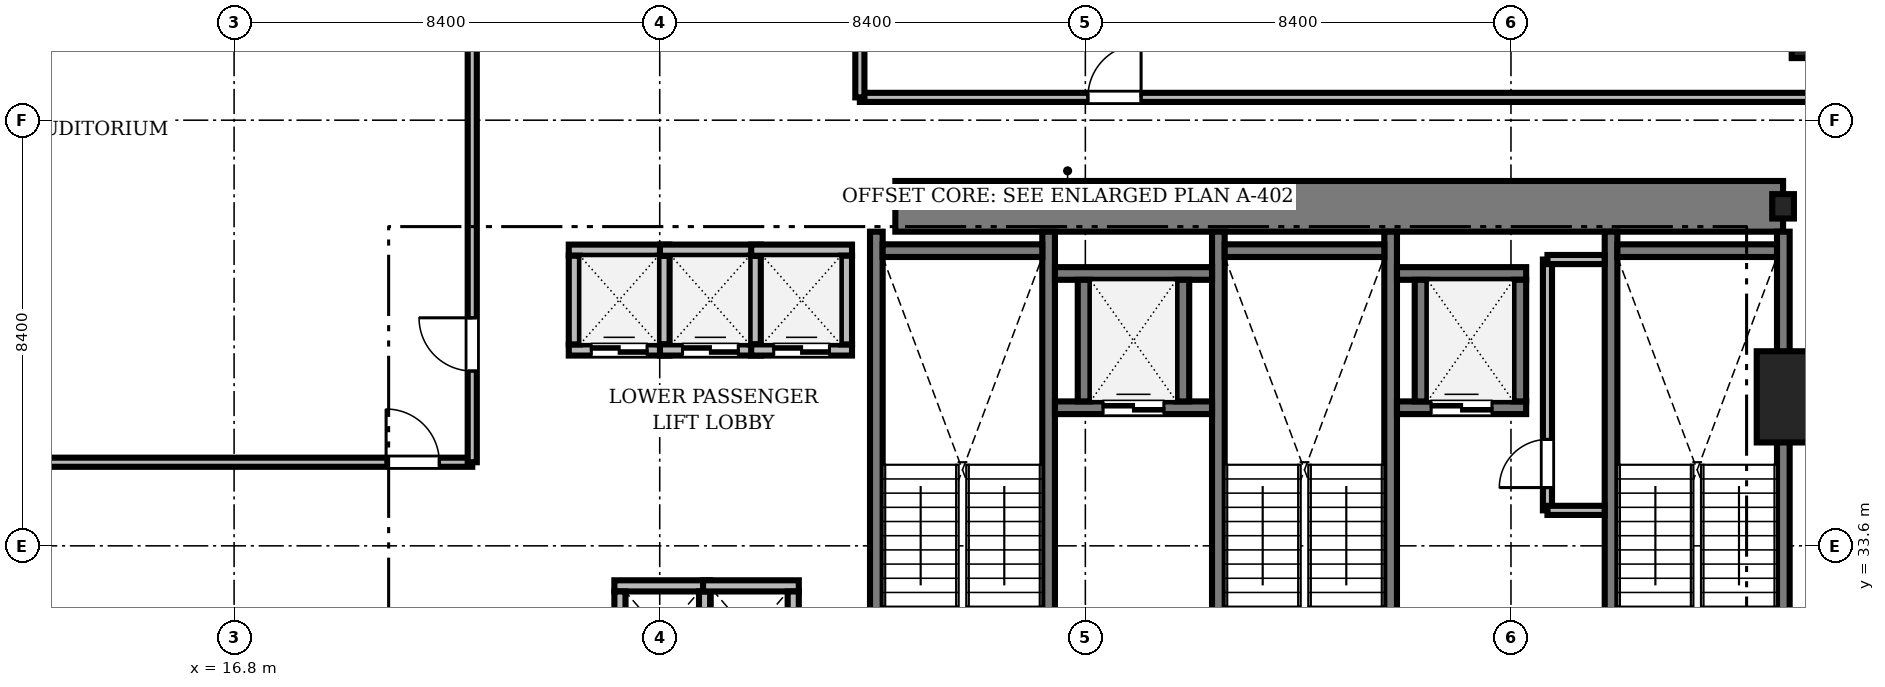
"""IFC4 building model, lengths in metres.
Left out: names, types, materials, properties, quantities, classifications, styles, units other than length and angle.
Written with IfcOpenShell. Run it as: python <this file> out.ifc"""

import sys

from ifc_helpers import new_model, si_unit, direction, frame, frame_2d, origin, origin_2d, place, context, subcontext, project, spatial, rectangle, i_section, extrude, source, transform, mapped, element, fill, save


model = new_model("IFC4")
c1 = context("Model", 3, precision=1e-05, world=origin(), true_north=direction((0.0, 1.0)))
c2 = subcontext(c1, "Body", "Model", "MODEL_VIEW")
j1 = project(units=[si_unit("LENGTHUNIT", "METRE"), si_unit("PLANEANGLEUNIT", "RADIAN")], contexts=[c1])
p1 = place(None, origin())
s1 = spatial("IfcSite", under=j1, at=p1, CompositionType="ELEMENT")
p2 = place(p1, origin())
s2 = spatial("IfcBuilding", under=s1, at=p2, CompositionType="ELEMENT")
p3 = place(p2, frame((0.0, 0.0, 64.1)))
s3 = spatial("IfcBuildingStorey", under=s2, at=p3, CompositionType="ELEMENT", Elevation=64.1)
m1 = source(origin(), c2, "Body", "SweptSolid", [
    extrude(rectangle(XDim=17.52, YDim=1.0, at=frame_2d((8.76, 0.0))), origin(), (0.0, 0.0, 1.0), 3.41),
])
p4 = place(p3, frame((29.85, 40.3, 0.0), z_axis=(0.0, 0.0, 1.0), x_axis=(1.0, 0.0, 0.0)))
e1 = element("IfcWall", 1, at=p4, inside=s3, PredefinedType="SHEAR", context=c2, shape_type="MappedRepresentation", body=[
    mapped(m1, transform((0.0, 0.0, 0.0), scale=1.0)),
])
m2 = source(origin(), c2, "Body", "SweptSolid", [
    extrude(i_section(OverallWidth=0.428, OverallDepth=0.481, WebThickness=0.04, FlangeThickness=0.063, FilletRadius=0.015, at=origin_2d()), origin(), (0.0, 0.0, 1.0), 3.41),
])
p5 = place(p3, frame((47.37, 40.3, 0.0), z_axis=(0.0, 0.0, 1.0), x_axis=(1.0, 0.0, 0.0)))
e2 = element("IfcColumn", 2, at=p5, inside=s3, PredefinedType="COLUMN", context=c2, shape_type="MappedRepresentation", body=[
    mapped(m2, transform((0.0, 0.0, 0.0), scale=1.0)),
])
m3 = source(origin(), c2, "Body", "SweptSolid", [
    extrude(rectangle(XDim=1.8, YDim=1.8, at=origin_2d()), origin(), (0.0, 0.0, 1.0), 3.41),
])
p6 = place(p3, frame((47.75, 36.54, 0.0), z_axis=(0.0, 0.0, 1.0), x_axis=(1.0, 0.0, 0.0)))
e3 = element("IfcColumn", 3, at=p6, inside=s3, PredefinedType="COLUMN", context=c2, shape_type="MappedRepresentation", body=[
    mapped(m3, transform((0.0, 0.0, 0.0), scale=1.0)),
])
m4 = source(origin(), c2, "Body", "SweptSolid", [
    extrude(i_section(OverallWidth=0.419, OverallDepth=0.449, WebThickness=0.031, FlangeThickness=0.048, FilletRadius=0.015, at=origin_2d()), origin(), (0.0, 0.0, 1.0), 3.41),
])
p7 = place(p3, frame((47.75, 43.45, 0.0), z_axis=(0.0, 0.0, 1.0), x_axis=(1.0, 0.0, 0.0)))
e4 = element("IfcColumn", 4, at=p7, inside=s3, PredefinedType="COLUMN", context=c2, shape_type="MappedRepresentation", body=[
    mapped(m4, transform((0.0, 0.0, 0.0), scale=1.0)),
])
m5 = source(origin(), c2, "Body", "SweptSolid", [
    extrude(rectangle(XDim=9.15, YDim=0.25, at=frame_2d((4.575, 0.0))), origin(), (0.0, 0.0, 1.0), 3.45),
])
for number, where, z_axis, x_axis in (
    (5, (29.475, 30.65, 0.0), (0.0, 0.0, 1.0), (0.0, 1.0, 0.0)),
    (6, (32.875, 30.65, 0.0), (0.0, 0.0, 1.0), (0.0, 1.0, 0.0)),
):
    element("IfcWall", number, at=place(p3, frame(where, z_axis=z_axis, x_axis=x_axis)), inside=s3, PredefinedType="SOLIDWALL", context=c2, shape_type="MappedRepresentation", body=[
        mapped(m5, transform((0.0, 0.0, 0.0), scale=1.0)),
    ])
m6 = source(origin(), c2, "Body", "SweptSolid", [
    extrude(rectangle(XDim=3.15, YDim=0.25, at=frame_2d((1.575, 0.0))), origin(), (0.0, 0.0, 1.0), 3.45),
])
p8 = place(p3, frame((29.6, 39.425, 0.0), z_axis=(0.0, 0.0, 1.0), x_axis=(1.0, 0.0, 0.0)))
e7 = element("IfcWall", 7, at=p8, inside=s3, PredefinedType="SOLIDWALL", context=c2, shape_type="MappedRepresentation", body=[
    mapped(m6, transform((0.0, 0.0, 0.0), scale=1.0)),
])
for number, where, z_axis, x_axis in (
    (8, (36.225, 30.65, 0.0), (0.0, 0.0, 1.0), (0.0, 1.0, 0.0)),
    (9, (39.625, 30.65, 0.0), (0.0, 0.0, 1.0), (0.0, 1.0, 0.0)),
):
    element("IfcWall", number, at=place(p3, frame(where, z_axis=z_axis, x_axis=x_axis)), inside=s3, PredefinedType="SOLIDWALL", context=c2, shape_type="MappedRepresentation", body=[
        mapped(m5, transform((0.0, 0.0, 0.0), scale=1.0)),
    ])
p9 = place(p3, frame((36.35, 39.425, 0.0), z_axis=(0.0, 0.0, 1.0), x_axis=(1.0, 0.0, 0.0)))
e10 = element("IfcWall", 10, at=p9, inside=s3, PredefinedType="SOLIDWALL", context=c2, shape_type="MappedRepresentation", body=[
    mapped(m6, transform((0.0, 0.0, 0.0), scale=1.0)),
])
for number, where, z_axis, x_axis in (
    (11, (43.975, 30.65, 0.0), (0.0, 0.0, 1.0), (0.0, 1.0, 0.0)),
    (12, (47.375, 30.65, 0.0), (0.0, 0.0, 1.0), (0.0, 1.0, 0.0)),
):
    element("IfcWall", number, at=place(p3, frame(where, z_axis=z_axis, x_axis=x_axis)), inside=s3, PredefinedType="SOLIDWALL", context=c2, shape_type="MappedRepresentation", body=[
        mapped(m5, transform((0.0, 0.0, 0.0), scale=1.0)),
    ])
p10 = place(p3, frame((44.1, 39.425, 0.0), z_axis=(0.0, 0.0, 1.0), x_axis=(1.0, 0.0, 0.0)))
e13 = element("IfcWall", 13, at=p10, inside=s3, PredefinedType="SOLIDWALL", context=c2, shape_type="MappedRepresentation", body=[
    mapped(m6, transform((0.0, 0.0, 0.0), scale=1.0)),
])
m7 = source(origin(), c2, "Body", "SweptSolid", [
    extrude(rectangle(XDim=1.99, YDim=0.22, at=frame_2d((0.995, 0.0))), origin(), (0.0, 0.0, 1.0), 3.41),
])
p11 = place(p3, frame((23.405, 37.465, 0.0), z_axis=(0.0, 0.0, 1.0), x_axis=(1.0, 0.0, 0.0)))
e14 = element("IfcWall", 14, at=p11, inside=s3, PredefinedType="SOLIDWALL", context=c2, shape_type="MappedRepresentation", body=[
    mapped(m7, transform((0.0, 0.0, 0.0), scale=1.0)),
])
m8 = source(origin(), c2, "Body", "SweptSolid", [
    extrude(rectangle(XDim=1.1, YDim=2.2, at=frame_2d((0.55, 1.1))), frame((0.0, 0.12, 0.0), z_axis=(0.0, -1.0, 0.0), x_axis=(1.0, 0.0, 0.0)), (0.0, 0.0, 1.0), 0.24),
])
p12 = place(p11, frame((0.445, 0.0, 0.0)))
e15 = element("IfcOpeningElement", 15, at=p12, cuts=e14, PredefinedType="OPENING", context=c2, shape_type="MappedRepresentation", body=[
    mapped(m8, transform((0.0, 0.0, 0.0), scale=1.0)),
])
p13 = place(p3, frame((23.405, 39.435, 0.0), z_axis=(0.0, 0.0, 1.0), x_axis=(1.0, 0.0, 0.0)))
e16 = element("IfcWall", 16, at=p13, inside=s3, PredefinedType="SOLIDWALL", context=c2, shape_type="MappedRepresentation", body=[
    mapped(m7, transform((0.0, 0.0, 0.0), scale=1.0)),
])
m9 = source(origin(), c2, "Body", "SweptSolid", [
    extrude(rectangle(XDim=1.75, YDim=0.22, at=frame_2d((0.875, 0.0))), origin(), (0.0, 0.0, 1.0), 3.41),
])
for number, where, z_axis, x_axis in (
    (17, (23.515, 37.575, 0.0), (0.0, 0.0, 1.0), (0.0, 1.0, 0.0)),
    (18, (25.285, 37.575, 0.0), (0.0, 0.0, 1.0), (0.0, 1.0, 0.0)),
):
    element("IfcWall", number, at=place(p3, frame(where, z_axis=z_axis, x_axis=x_axis)), inside=s3, PredefinedType="SOLIDWALL", context=c2, shape_type="MappedRepresentation", body=[
        mapped(m9, transform((0.0, 0.0, 0.0), scale=1.0)),
    ])
p14 = place(p3, frame((25.205, 37.465, 0.0), z_axis=(0.0, 0.0, 1.0), x_axis=(1.0, 0.0, 0.0)))
e19 = element("IfcWall", 19, at=p14, inside=s3, PredefinedType="SOLIDWALL", context=c2, shape_type="MappedRepresentation", body=[
    mapped(m7, transform((0.0, 0.0, 0.0), scale=1.0)),
])
p15 = place(p14, frame((0.445, 0.0, 0.0)))
e20 = element("IfcOpeningElement", 20, at=p15, cuts=e19, PredefinedType="OPENING", context=c2, shape_type="MappedRepresentation", body=[
    mapped(m8, transform((0.0, 0.0, 0.0), scale=1.0)),
])
p16 = place(p3, frame((25.205, 39.435, 0.0), z_axis=(0.0, 0.0, 1.0), x_axis=(1.0, 0.0, 0.0)))
e21 = element("IfcWall", 21, at=p16, inside=s3, PredefinedType="SOLIDWALL", context=c2, shape_type="MappedRepresentation", body=[
    mapped(m7, transform((0.0, 0.0, 0.0), scale=1.0)),
])
p17 = place(p3, frame((27.085, 37.575, 0.0), z_axis=(0.0, 0.0, 1.0), x_axis=(0.0, 1.0, 0.0)))
e22 = element("IfcWall", 22, at=p17, inside=s3, PredefinedType="SOLIDWALL", context=c2, shape_type="MappedRepresentation", body=[
    mapped(m9, transform((0.0, 0.0, 0.0), scale=1.0)),
])
m10 = source(origin(), c2, "Body", "SweptSolid", [
    extrude(rectangle(XDim=1.99, YDim=0.22, at=frame_2d((0.995, 0.0))), origin(), (0.0, 0.0, 1.0), 3.41),
])
p18 = place(p3, frame((27.005, 37.465, 0.0), z_axis=(0.0, 0.0, 1.0), x_axis=(1.0, 0.0, 0.0)))
e23 = element("IfcWall", 23, at=p18, inside=s3, PredefinedType="SOLIDWALL", context=c2, shape_type="MappedRepresentation", body=[
    mapped(m10, transform((0.0, 0.0, 0.0), scale=1.0)),
])
p19 = place(p18, frame((0.445, 0.0, 0.0)))
e24 = element("IfcOpeningElement", 24, at=p19, cuts=e23, PredefinedType="OPENING", context=c2, shape_type="MappedRepresentation", body=[
    mapped(m8, transform((0.0, 0.0, 0.0), scale=1.0)),
])
p20 = place(p3, frame((27.005, 39.435, 0.0), z_axis=(0.0, 0.0, 1.0), x_axis=(1.0, 0.0, 0.0)))
e25 = element("IfcWall", 25, at=p20, inside=s3, PredefinedType="SOLIDWALL", context=c2, shape_type="MappedRepresentation", body=[
    mapped(m10, transform((0.0, 0.0, 0.0), scale=1.0)),
])
p21 = place(p3, frame((28.885, 37.575, 0.0), z_axis=(0.0, 0.0, 1.0), x_axis=(0.0, 1.0, 0.0)))
e26 = element("IfcWall", 26, at=p21, inside=s3, PredefinedType="SOLIDWALL", context=c2, shape_type="MappedRepresentation", body=[
    mapped(m9, transform((0.0, 0.0, 0.0), scale=1.0)),
])
m11 = source(origin(), c2, "Body", "SweptSolid", [
    extrude(rectangle(XDim=3.1, YDim=0.25, at=frame_2d((1.55, 0.0))), origin(), (0.0, 0.0, 1.0), 3.41),
])
p22 = place(p3, frame((33.0, 36.325, 0.0), z_axis=(0.0, 0.0, 1.0), x_axis=(1.0, 0.0, 0.0)))
e27 = element("IfcWall", 27, at=p22, inside=s3, PredefinedType="SOLIDWALL", context=c2, shape_type="MappedRepresentation", body=[
    mapped(m11, transform((0.0, 0.0, 0.0), scale=1.0)),
])
m12 = source(origin(), c2, "Body", "SweptSolid", [
    extrude(rectangle(XDim=1.2, YDim=2.25, at=frame_2d((0.6, 1.125))), frame((0.0, 0.135, 0.0), z_axis=(0.0, -1.0, 0.0), x_axis=(1.0, 0.0, 0.0)), (0.0, 0.0, 1.0), 0.27),
])
p23 = place(p22, frame((0.95, 0.0, 0.0)))
e28 = element("IfcOpeningElement", 28, at=p23, cuts=e27, PredefinedType="OPENING", context=c2, shape_type="MappedRepresentation", body=[
    mapped(m12, transform((0.0, 0.0, 0.0), scale=1.0)),
])
p24 = place(p3, frame((33.0, 38.975, 0.0), z_axis=(0.0, 0.0, 1.0), x_axis=(1.0, 0.0, 0.0)))
e29 = element("IfcWall", 29, at=p24, inside=s3, PredefinedType="SOLIDWALL", context=c2, shape_type="MappedRepresentation", body=[
    mapped(m11, transform((0.0, 0.0, 0.0), scale=1.0)),
])
m13 = source(origin(), c2, "Body", "SweptSolid", [
    extrude(rectangle(XDim=2.4, YDim=0.25, at=frame_2d((1.2, 0.0))), origin(), (0.0, 0.0, 1.0), 3.41),
])
for number, where, z_axis, x_axis in (
    (30, (33.575, 36.45, 0.0), (0.0, 0.0, 1.0), (0.0, 1.0, 0.0)),
    (31, (35.525, 36.45, 0.0), (0.0, 0.0, 1.0), (0.0, 1.0, 0.0)),
):
    element("IfcWall", number, at=place(p3, frame(where, z_axis=z_axis, x_axis=x_axis)), inside=s3, PredefinedType="SOLIDWALL", context=c2, shape_type="MappedRepresentation", body=[
        mapped(m13, transform((0.0, 0.0, 0.0), scale=1.0)),
    ])
m14 = source(origin(), c2, "Body", "SweptSolid", [
    extrude(rectangle(XDim=2.55, YDim=0.25, at=frame_2d((1.275, 0.0))), origin(), (0.0, 0.0, 1.0), 3.41),
])
p25 = place(p3, frame((39.75, 36.325, 0.0), z_axis=(0.0, 0.0, 1.0), x_axis=(1.0, 0.0, 0.0)))
e32 = element("IfcWall", 32, at=p25, inside=s3, PredefinedType="SOLIDWALL", context=c2, shape_type="MappedRepresentation", body=[
    mapped(m14, transform((0.0, 0.0, 0.0), scale=1.0)),
])
p26 = place(p25, frame((0.675, 0.0, 0.0)))
e33 = element("IfcOpeningElement", 33, at=p26, cuts=e32, PredefinedType="OPENING", context=c2, shape_type="MappedRepresentation", body=[
    mapped(m12, transform((0.0, 0.0, 0.0), scale=1.0)),
])
p27 = place(p3, frame((39.75, 38.975, 0.0), z_axis=(0.0, 0.0, 1.0), x_axis=(1.0, 0.0, 0.0)))
e34 = element("IfcWall", 34, at=p27, inside=s3, PredefinedType="SOLIDWALL", context=c2, shape_type="MappedRepresentation", body=[
    mapped(m14, transform((0.0, 0.0, 0.0), scale=1.0)),
])
for number, where, z_axis, x_axis in (
    (35, (40.225, 36.45, 0.0), (0.0, 0.0, 1.0), (0.0, 1.0, 0.0)),
    (36, (42.175, 36.45, 0.0), (0.0, 0.0, 1.0), (0.0, 1.0, 0.0)),
):
    element("IfcWall", number, at=place(p3, frame(where, z_axis=z_axis, x_axis=x_axis)), inside=s3, PredefinedType="SOLIDWALL", context=c2, shape_type="MappedRepresentation", body=[
        mapped(m13, transform((0.0, 0.0, 0.0), scale=1.0)),
    ])
m15 = source(origin(), c2, "Body", "SweptSolid", [
    extrude(rectangle(XDim=1.89, YDim=0.22, at=frame_2d((0.945, 0.0))), origin(), (0.0, 0.0, 1.0), 3.41),
])
p28 = place(p3, frame((24.305, 32.81, 0.0), z_axis=(0.0, 0.0, 1.0), x_axis=(1.0, 0.0, 0.0)))
e37 = element("IfcWall", 37, at=p28, inside=s3, PredefinedType="SOLIDWALL", context=c2, shape_type="MappedRepresentation", body=[
    mapped(m15, transform((0.0, 0.0, 0.0), scale=1.0)),
])
m16 = source(origin(), c2, "Body", "SweptSolid", [
    extrude(rectangle(XDim=1.7, YDim=0.22, at=frame_2d((0.85, 0.0))), origin(), (0.0, 0.0, 1.0), 3.41),
])
for number, where, z_axis, x_axis in (
    (38, (24.415, 31.0, 0.0), (0.0, 0.0, 1.0), (0.0, 1.0, 0.0)),
    (39, (26.085, 31.0, 0.0), (0.0, 0.0, 1.0), (0.0, 1.0, 0.0)),
):
    element("IfcWall", number, at=place(p3, frame(where, z_axis=z_axis, x_axis=x_axis)), inside=s3, PredefinedType="SOLIDWALL", context=c2, shape_type="MappedRepresentation", body=[
        mapped(m16, transform((0.0, 0.0, 0.0), scale=1.0)),
    ])
p29 = place(p3, frame((26.055, 32.81, 0.0), z_axis=(0.0, 0.0, 1.0), x_axis=(1.0, 0.0, 0.0)))
e40 = element("IfcWall", 40, at=p29, inside=s3, PredefinedType="SOLIDWALL", context=c2, shape_type="MappedRepresentation", body=[
    mapped(m15, transform((0.0, 0.0, 0.0), scale=1.0)),
])
p30 = place(p3, frame((27.835, 31.0, 0.0), z_axis=(0.0, 0.0, 1.0), x_axis=(0.0, 1.0, 0.0)))
e41 = element("IfcWall", 41, at=p30, inside=s3, PredefinedType="SOLIDWALL", context=c2, shape_type="MappedRepresentation", body=[
    mapped(m16, transform((0.0, 0.0, 0.0), scale=1.0)),
])
m17 = source(origin(), c2, "Body", "SweptSolid", [
    extrude(rectangle(XDim=19.428, YDim=0.18, at=frame_2d((9.714, 0.0))), origin(), (0.0, 0.0, 1.0), 2.652),
])
p31 = place(p3, frame((29.15, 42.45, 0.0), z_axis=(0.0, 0.0, 1.0), x_axis=(1.0, 0.0, 0.0)))
e42 = element("IfcWall", 42, at=p31, inside=s3, PredefinedType="PARTITIONING", context=c2, shape_type="MappedRepresentation", body=[
    mapped(m17, transform((0.0, 0.0, 0.0), scale=1.0)),
])
m18 = source(origin(), c2, "Body", "SweptSolid", [
    extrude(rectangle(XDim=1.05, YDim=2.2, at=frame_2d((0.525, 1.1))), frame((0.0, 0.1, 0.0), z_axis=(0.0, -1.0, 0.0), x_axis=(1.0, 0.0, 0.0)), (0.0, 0.0, 1.0), 0.2),
])
p32 = place(p31, frame((4.5, 0.0, 0.0)))
e43 = element("IfcOpeningElement", 43, at=p32, cuts=e42, PredefinedType="OPENING", context=c2, shape_type="MappedRepresentation", body=[
    mapped(m18, transform((0.0, 0.0, 0.0), scale=1.0)),
])
m19 = source(origin(), c2, "Body", "SweptSolid", [
    extrude(rectangle(XDim=19.078, YDim=0.18, at=frame_2d((9.539, 0.0))), origin(), (0.0, 0.0, 1.0), 2.652),
])
p33 = place(p3, frame((2.422, 35.25, 0.0), z_axis=(0.0, 0.0, 1.0), x_axis=(1.0, 0.0, 0.0)))
e44 = element("IfcWall", 44, at=p33, inside=s3, PredefinedType="PARTITIONING", context=c2, shape_type="MappedRepresentation", body=[
    mapped(m19, transform((0.0, 0.0, 0.0), scale=1.0)),
])
p34 = place(p33, frame((17.378, 0.0, 0.0)))
e45 = element("IfcOpeningElement", 45, at=p34, cuts=e44, PredefinedType="OPENING", context=c2, shape_type="MappedRepresentation", body=[
    mapped(m18, transform((0.0, 0.0, 0.0), scale=1.0)),
])
m20 = source(origin(), c2, "Body", "SweptSolid", [
    extrude(rectangle(XDim=13.028, YDim=0.18, at=frame_2d((6.514, 0.0))), origin(), (0.0, 0.0, 1.0), 2.652),
])
p35 = place(p3, frame((21.5, 35.25, 0.0), z_axis=(0.0, 0.0, 1.0), x_axis=(0.0, 1.0, 0.0)))
e46 = element("IfcWall", 46, at=p35, inside=s3, PredefinedType="PARTITIONING", context=c2, shape_type="MappedRepresentation", body=[
    mapped(m20, transform((0.0, 0.0, 0.0), scale=1.0)),
])
p36 = place(p35, frame((1.8, 0.0, 0.0)))
e47 = element("IfcOpeningElement", 47, at=p36, cuts=e46, PredefinedType="OPENING", context=c2, shape_type="MappedRepresentation", body=[
    mapped(m18, transform((0.0, 0.0, 0.0), scale=1.0)),
])
m21 = source(origin(), c2, "Body", "SweptSolid", [
    extrude(rectangle(XDim=4.95, YDim=0.18, at=frame_2d((2.475, 0.0))), origin(), (0.0, 0.0, 1.0), 3.41),
])
p37 = place(p3, frame((42.72, 34.3, 0.0), z_axis=(0.0, 0.0, 1.0), x_axis=(0.0, 1.0, 0.0)))
e48 = element("IfcWall", 48, at=p37, inside=s3, PredefinedType="PARTITIONING", context=c2, shape_type="MappedRepresentation", body=[
    mapped(m21, transform((0.0, 0.0, 0.0), scale=1.0)),
])
m22 = source(origin(), c2, "Body", "SweptSolid", [
    extrude(rectangle(XDim=0.95, YDim=2.15, at=frame_2d((0.475, 1.075))), frame((0.0, 0.1, 0.0), z_axis=(0.0, -1.0, 0.0), x_axis=(1.0, 0.0, 0.0)), (0.0, 0.0, 1.0), 0.2),
])
p38 = place(p37, frame((0.45, 0.0, 0.0)))
e49 = element("IfcOpeningElement", 49, at=p38, cuts=e48, PredefinedType="OPENING", context=c2, shape_type="MappedRepresentation", body=[
    mapped(m22, transform((0.0, 0.0, 0.0), scale=1.0)),
])
m23 = source(origin(), c2, "Body", "SweptSolid", [
    extrude(rectangle(XDim=5.828, YDim=0.18, at=frame_2d((2.914, 0.0))), origin(), (0.0, 0.0, 1.0), 2.652),
])
p39 = place(p3, frame((29.15, 42.45, 0.0), z_axis=(0.0, 0.0, 1.0), x_axis=(0.0, 1.0, 0.0)))
e50 = element("IfcWall", 50, at=p39, inside=s3, PredefinedType="PARTITIONING", context=c2, shape_type="MappedRepresentation", body=[
    mapped(m23, transform((0.0, 0.0, 0.0), scale=1.0)),
])
m24 = source(origin(), c2, "Body", "SweptSolid", [
    extrude(rectangle(XDim=1.128, YDim=0.18, at=frame_2d((0.564, 0.0))), origin(), (0.0, 0.0, 1.0), 3.41),
])
for number, where, z_axis, x_axis in (
    (51, (42.72, 34.3, 0.0), (0.0, 0.0, 1.0), (1.0, 0.0, 0.0)),
    (52, (42.72, 39.25, 0.0), (0.0, 0.0, 1.0), (1.0, 0.0, 0.0)),
):
    element("IfcWall", number, at=place(p3, frame(where, z_axis=z_axis, x_axis=x_axis)), inside=s3, PredefinedType="PARTITIONING", context=c2, shape_type="MappedRepresentation", body=[
        mapped(m24, transform((0.0, 0.0, 0.0), scale=1.0)),
    ])
m25 = source(origin(), c2, "Body", "SweptSolid", [
    extrude(rectangle(XDim=1.1, YDim=2.2, at=frame_2d((0.55, 1.1))), frame((0.0, 0.025, 0.0), z_axis=(0.0, -1.0, 0.0), x_axis=(1.0, 0.0, 0.0)), (0.0, 0.0, 1.0), 0.05),
])
p40 = place(p12, origin())
e53 = element("IfcDoor", 53, at=p40, inside=s3, OperationType="DOUBLE_DOOR_SLIDING", PredefinedType="DOOR", context=c2, shape_type="MappedRepresentation", body=[
    mapped(m25, transform((0.0, 0.0, 0.0), scale=1.0)),
])
fill(e15, e53)
p41 = place(p15, origin())
e54 = element("IfcDoor", 54, at=p41, inside=s3, OperationType="DOUBLE_DOOR_SLIDING", PredefinedType="DOOR", context=c2, shape_type="MappedRepresentation", body=[
    mapped(m25, transform((0.0, 0.0, 0.0), scale=1.0)),
])
fill(e20, e54)
p42 = place(p19, origin())
e55 = element("IfcDoor", 55, at=p42, inside=s3, OperationType="DOUBLE_DOOR_SLIDING", PredefinedType="DOOR", context=c2, shape_type="MappedRepresentation", body=[
    mapped(m25, transform((0.0, 0.0, 0.0), scale=1.0)),
])
fill(e24, e55)
m26 = source(origin(), c2, "Body", "SweptSolid", [
    extrude(rectangle(XDim=1.2, YDim=2.25, at=frame_2d((0.6, 1.125))), frame((0.0, 0.025, 0.0), z_axis=(0.0, -1.0, 0.0), x_axis=(1.0, 0.0, 0.0)), (0.0, 0.0, 1.0), 0.05),
])
p43 = place(p23, origin())
e56 = element("IfcDoor", 56, at=p43, inside=s3, OperationType="DOUBLE_DOOR_SLIDING", PredefinedType="DOOR", context=c2, shape_type="MappedRepresentation", body=[
    mapped(m26, transform((0.0, 0.0, 0.0), scale=1.0)),
])
fill(e28, e56)
p44 = place(p26, origin())
e57 = element("IfcDoor", 57, at=p44, inside=s3, OperationType="DOUBLE_DOOR_SLIDING", PredefinedType="DOOR", context=c2, shape_type="MappedRepresentation", body=[
    mapped(m26, transform((0.0, 0.0, 0.0), scale=1.0)),
])
fill(e33, e57)
m27 = source(origin(), c2, "Body", "SweptSolid", [
    extrude(rectangle(XDim=1.05, YDim=2.2, at=frame_2d((0.525, 1.1))), frame((0.0, 0.025, 0.0), z_axis=(0.0, -1.0, 0.0), x_axis=(1.0, 0.0, 0.0)), (0.0, 0.0, 1.0), 0.05),
])
p45 = place(p32, origin())
e58 = element("IfcDoor", 58, at=p45, inside=s3, OperationType="SINGLE_SWING_RIGHT", PredefinedType="DOOR", context=c2, shape_type="MappedRepresentation", body=[
    mapped(m27, transform((0.0, 0.0, 0.0), scale=1.0)),
])
fill(e43, e58)
p46 = place(p34, origin())
e59 = element("IfcDoor", 59, at=p46, inside=s3, OperationType="SINGLE_SWING_LEFT", PredefinedType="DOOR", context=c2, shape_type="MappedRepresentation", body=[
    mapped(m27, transform((0.0, 0.0, 0.0), scale=1.0)),
])
fill(e45, e59)
p47 = place(p36, origin())
e60 = element("IfcDoor", 60, at=p47, inside=s3, OperationType="SINGLE_SWING_RIGHT", PredefinedType="DOOR", context=c2, shape_type="MappedRepresentation", body=[
    mapped(m27, transform((0.0, 0.0, 0.0), scale=1.0)),
])
fill(e47, e60)
m28 = source(origin(), c2, "Body", "SweptSolid", [
    extrude(rectangle(XDim=0.95, YDim=2.15, at=frame_2d((0.475, 1.075))), frame((0.0, 0.025, 0.0), z_axis=(0.0, -1.0, 0.0), x_axis=(1.0, 0.0, 0.0)), (0.0, 0.0, 1.0), 0.05),
])
p48 = place(p38, origin())
e61 = element("IfcDoor", 61, at=p48, inside=s3, OperationType="SINGLE_SWING_LEFT", PredefinedType="DOOR", context=c2, shape_type="MappedRepresentation", body=[
    mapped(m28, transform((0.0, 0.0, 0.0), scale=1.0)),
])
fill(e49, e61)
save(model, sys.argv[1])
